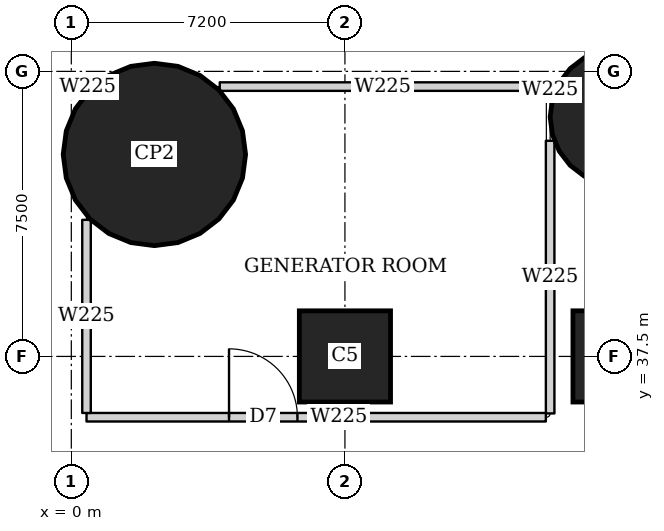
"""IFC4 building model, lengths in metres.
Left out: names, types, materials, properties, quantities, classifications, styles, units other than length and angle.
Written with IfcOpenShell. Run it as: python <this file> out.ifc"""

import sys

from ifc_helpers import new_model, si_unit, direction, frame, frame_2d, origin, origin_2d, place, context, subcontext, project, spatial, rectangle, circle, extrude, element, fill, save


model = new_model("IFC4")
c1 = context("Model", 3, precision=1e-05, world=origin(), true_north=direction((0.0, 1.0)))
c2 = subcontext(c1, "Body", "Model", "MODEL_VIEW")
j1 = project(units=[si_unit("LENGTHUNIT", "METRE"), si_unit("PLANEANGLEUNIT", "RADIAN")], contexts=[c1])
p1 = place(None, origin())
s1 = spatial("IfcSite", under=j1, at=p1, CompositionType="ELEMENT")
p2 = place(p1, origin())
s2 = spatial("IfcBuilding", under=s1, at=p2, CompositionType="ELEMENT")
p3 = place(p2, frame((0.0, 0.0, -8.0)))
s3 = spatial("IfcBuildingStorey", under=s2, at=p3, CompositionType="ELEMENT", Elevation=-8.0)
for number, where, z_axis, x_axis in (
    (1, (7.2, 37.5, -0.4), (0.0, 0.0, 1.0), (1.0, 0.0, 0.0)),
    (2, (14.4, 37.5, -0.4), (0.0, 0.0, 1.0), (1.0, 0.0, 0.0)),
):
    element("IfcColumn", number, at=place(p3, frame(where, z_axis=z_axis, x_axis=x_axis)), inside=s3, PredefinedType="COLUMN", context=c2, shape_type="SweptSolid", body=[
        extrude(rectangle(XDim=2.4, YDim=2.4, at=origin_2d()), origin(), (0.0, 0.0, 1.0), 4.4),
    ])
p4 = place(p3, frame((2.186, 42.814, -1.0), z_axis=(0.0, 0.0, 1.0), x_axis=(1.0, 0.0, 0.0)))
e3 = element("IfcColumn", 3, at=p4, inside=s3, PredefinedType="COLUMN", context=c2, shape_type="SweptSolid", body=[
    extrude(circle(Radius=2.4, at=origin_2d()), origin(), (0.0, 0.0, 1.0), 5.0),
])
p5 = place(p3, frame((14.4, 43.8, -0.4), z_axis=(0.0, 0.0, 1.0), x_axis=(1.0, 0.0, 0.0)))
e4 = element("IfcColumn", 4, at=p5, inside=s3, PredefinedType="COLUMN", context=c2, shape_type="SweptSolid", body=[
    extrude(circle(Radius=1.8, at=origin_2d()), origin(), (0.0, 0.0, 1.0), 4.4),
])
p6 = place(p3, frame((0.4, 35.9, 0.0), z_axis=(0.0, 0.0, 1.0), x_axis=(1.0, 0.0, 0.0)))
e5 = element("IfcWall", 5, at=p6, inside=s3, PredefinedType="SOLIDWALL", context=c2, shape_type="SweptSolid", body=[
    extrude(rectangle(XDim=12.087, YDim=0.225, at=frame_2d((6.043, 0.0))), origin(), (0.0, 0.0, 1.0), 2.55),
])
p7 = place(p6, frame((3.75, 0.0, 0.0)))
e6 = element("IfcOpeningElement", 6, at=p7, cuts=e5, PredefinedType="OPENING", context=c2, shape_type="SweptSolid", body=[
    extrude(rectangle(XDim=1.8, YDim=2.4, at=frame_2d((0.9, 1.2))), frame((0.0, 0.123, 0.0), z_axis=(0.0, -1.0, 0.0), x_axis=(1.0, 0.0, 0.0)), (0.0, 0.0, 1.0), 0.245),
])
p8 = place(p3, frame((0.4, 36.012, 0.0), z_axis=(0.0, 0.0, 1.0), x_axis=(0.0, 1.0, 0.0)))
e7 = element("IfcWall", 7, at=p8, inside=s3, PredefinedType="SOLIDWALL", context=c2, shape_type="SweptSolid", body=[
    extrude(rectangle(XDim=5.082, YDim=0.225, at=frame_2d((2.541, 0.0))), origin(), (0.0, 0.0, 1.0), 3.55),
])
p9 = place(p3, frame((12.6, 36.0, 0.0), z_axis=(0.0, 0.0, 1.0), x_axis=(0.0, 1.0, 0.0)))
e8 = element("IfcWall", 8, at=p9, inside=s3, PredefinedType="SOLIDWALL", context=c2, shape_type="SweptSolid", body=[
    extrude(rectangle(XDim=7.174, YDim=0.225, at=frame_2d((3.587, 0.0))), origin(), (0.0, 0.0, 1.0), 2.55),
])
p10 = place(p3, frame((12.6, 44.426, 0.0), z_axis=(0.0, 0.0, 1.0), x_axis=(0.0, 1.0, 0.0)))
e9 = element("IfcWall", 9, at=p10, inside=s3, PredefinedType="SOLIDWALL", context=c2, shape_type="SweptSolid", body=[
    extrude(rectangle(XDim=0.174, YDim=0.225, at=frame_2d((0.087, 0.0))), origin(), (0.0, 0.0, 1.0), 3.55),
])
p11 = place(p3, frame((0.4, 44.6, 0.0), z_axis=(0.0, 0.0, 1.0), x_axis=(1.0, 0.0, 0.0)))
e10 = element("IfcWall", 10, at=p11, inside=s3, PredefinedType="SOLIDWALL", context=c2, shape_type="SweptSolid", body=[
    extrude(rectangle(XDim=0.066, YDim=0.225, at=frame_2d((0.033, 0.0))), origin(), (0.0, 0.0, 1.0), 3.55),
])
p12 = place(p3, frame((3.906, 44.6, 0.0), z_axis=(0.0, 0.0, 1.0), x_axis=(1.0, 0.0, 0.0)))
e11 = element("IfcWall", 11, at=p12, inside=s3, PredefinedType="SOLIDWALL", context=c2, shape_type="SweptSolid", body=[
    extrude(rectangle(XDim=8.581, YDim=0.225, at=frame_2d((4.291, 0.0))), origin(), (0.0, 0.0, 1.0), 3.55),
])
p13 = place(p7, origin())
e12 = element("IfcDoor", 12, at=p13, inside=s3, OperationType="DOUBLE_DOOR_SINGLE_SWING", PredefinedType="DOOR", context=c2, shape_type="SweptSolid", body=[
    extrude(rectangle(XDim=1.8, YDim=2.4, at=frame_2d((0.9, 1.2))), frame((0.0, 0.025, 0.0), z_axis=(0.0, -1.0, 0.0), x_axis=(1.0, 0.0, 0.0)), (0.0, 0.0, 1.0), 0.05),
])
fill(e6, e12)
save(model, sys.argv[1])
